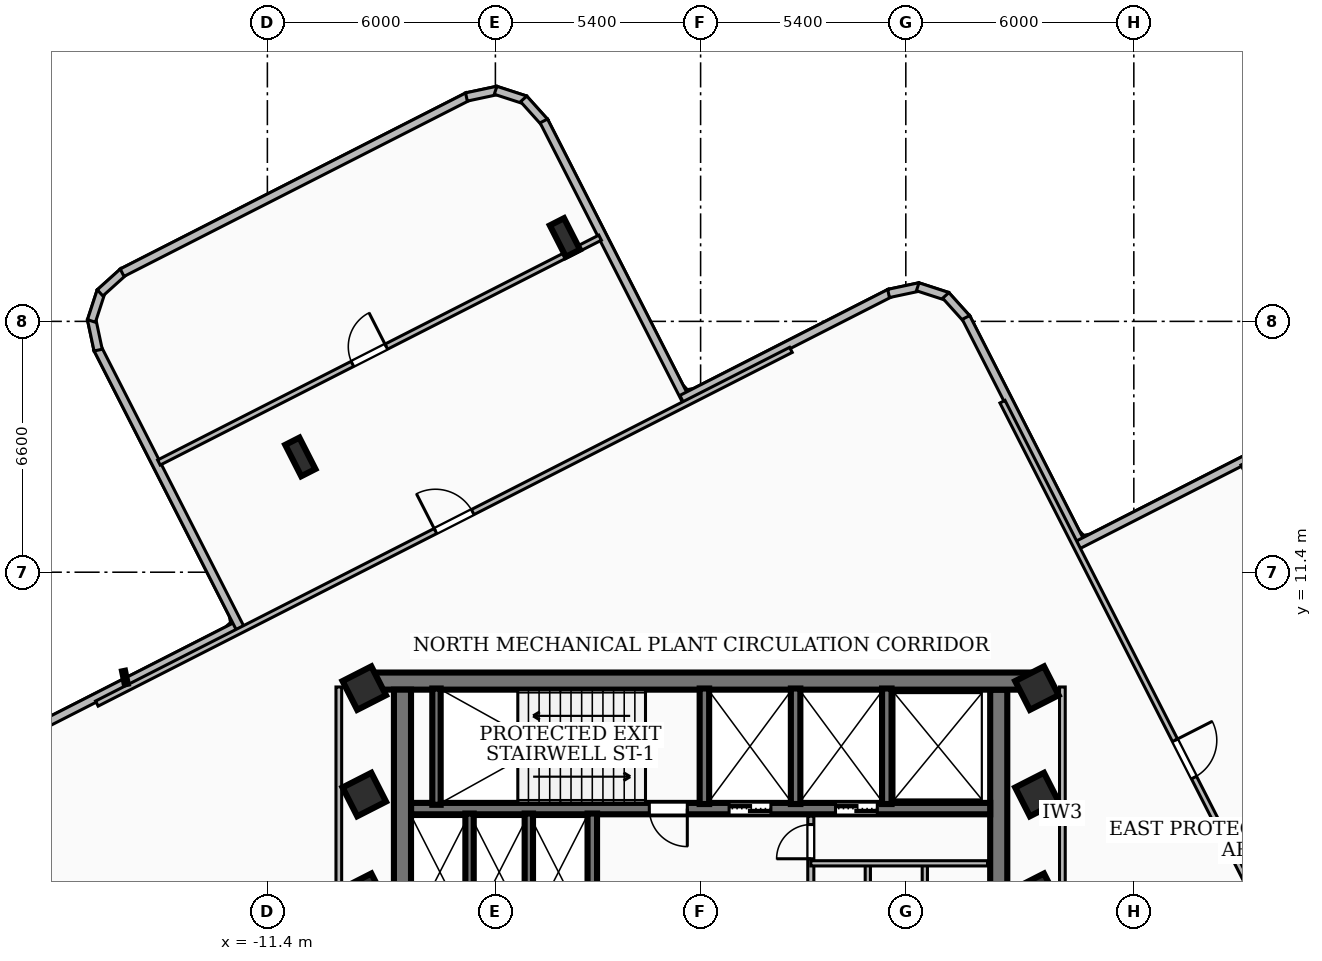
"""IFC4 building model, lengths in metres.
Left out: names, types, materials, properties, quantities, classifications, styles, units other than length and angle.
Written with IfcOpenShell. Run it as: python <this file> out.ifc"""

import sys

from ifc_helpers import new_model, si_unit, direction, frame, frame_2d, origin, origin_2d, place, context, subcontext, project, spatial, rectangle, i_section, extrude, element, fill, save


model = new_model("IFC4")
c1 = context("Model", 3, precision=1e-05, world=origin(), true_north=direction((0.0, 1.0)))
c2 = subcontext(c1, "Body", "Model", "MODEL_VIEW")
j1 = project(units=[si_unit("LENGTHUNIT", "METRE"), si_unit("PLANEANGLEUNIT", "RADIAN")], contexts=[c1])
p1 = place(None, origin())
s1 = spatial("IfcSite", under=j1, at=p1, CompositionType="ELEMENT")
p2 = place(p1, origin())
s2 = spatial("IfcBuilding", under=s1, at=p2, CompositionType="ELEMENT")
p3 = place(p2, frame((0.0, 0.0, 196.2)))
s3 = spatial("IfcBuildingStorey", under=s2, at=p3, CompositionType="ELEMENT", Elevation=196.2)
p4 = place(p3, frame((-8.78, 8.535, 0.0), z_axis=(0.0, 0.0, 1.0), x_axis=(1.0, 0.0, 0.0)))
e1 = element("IfcWall", 1, at=p4, inside=s3, PredefinedType="SHEAR", context=c2, shape_type="SweptSolid", body=[
    extrude(rectangle(XDim=17.56, YDim=0.45, at=frame_2d((8.78, 0.0))), origin(), (0.0, 0.0, 1.0), 4.42),
])
for number, where, z_axis, x_axis in (
    (2, (-7.845, 1.975, 0.0), (0.0, 0.0, 1.0), (0.0, 1.0, 0.0)),
    (3, (7.845, 8.31, 0.0), (0.0, 0.0, 1.0), (0.0, -1.0, 0.0)),
):
    element("IfcWall", number, at=place(p3, frame(where, z_axis=z_axis, x_axis=x_axis)), inside=s3, PredefinedType="SHEAR", context=c2, shape_type="SweptSolid", body=[
        extrude(rectangle(XDim=6.335, YDim=0.45, at=frame_2d((3.167, 0.0))), origin(), (0.0, 0.0, 1.0), 4.42),
    ])
p5 = place(p3, frame((7.62, 5.18, 0.0), z_axis=(0.0, 0.0, 1.0), x_axis=(-1.0, 0.0, 0.0)))
e4 = element("IfcWall", 4, at=p5, inside=s3, PredefinedType="SOLIDWALL", context=c2, shape_type="SweptSolid", body=[
    extrude(rectangle(XDim=15.24, YDim=0.3, at=frame_2d((7.62, 0.0))), origin(), (0.0, 0.0, 1.0), 4.42),
])
p6 = place(p5, frame((5.77, 0.0, 0.0)))
e5 = element("IfcOpeningElement", 5, at=p6, cuts=e4, PredefinedType="OPENING", context=c2, shape_type="SweptSolid", body=[
    extrude(rectangle(XDim=1.1, YDim=2.15, at=frame_2d((0.55, 1.075))), frame((0.0, 0.16, 0.0), z_axis=(0.0, -1.0, 0.0), x_axis=(1.0, 0.0, 0.0)), (0.0, 0.0, 1.0), 0.32),
])
p7 = place(p5, frame((2.97, 0.0, 0.0)))
e6 = element("IfcOpeningElement", 6, at=p7, cuts=e4, PredefinedType="OPENING", context=c2, shape_type="SweptSolid", body=[
    extrude(rectangle(XDim=1.1, YDim=2.15, at=frame_2d((0.55, 1.075))), frame((0.0, 0.16, 0.0), z_axis=(0.0, -1.0, 0.0), x_axis=(1.0, 0.0, 0.0)), (0.0, 0.0, 1.0), 0.32),
])
p8 = place(p5, frame((7.97, 0.0, 0.0)))
e7 = element("IfcOpeningElement", 7, at=p8, cuts=e4, PredefinedType="OPENING", context=c2, shape_type="SweptSolid", body=[
    extrude(rectangle(XDim=1.0, YDim=2.1, at=frame_2d((0.5, 1.05))), frame((0.0, 0.16, 0.0), z_axis=(0.0, -1.0, 0.0), x_axis=(1.0, 0.0, 0.0)), (0.0, 0.0, 1.0), 0.32),
])
p9 = place(p3, frame((-6.95, 5.28, 0.0), z_axis=(0.0, 0.0, 1.0), x_axis=(0.0, 1.0, 0.0)))
e8 = element("IfcWall", 8, at=p9, inside=s3, PredefinedType="SOLIDWALL", context=c2, shape_type="SweptSolid", body=[
    extrude(rectangle(XDim=3.06, YDim=0.22, at=frame_2d((1.53, 0.0))), origin(), (0.0, 0.0, 1.0), 4.42),
])
for number, where, z_axis, x_axis in (
    (9, (0.1, 5.3, 0.0), (0.0, 0.0, 1.0), (0.0, 1.0, 0.0)),
    (10, (2.5, 5.3, 0.0), (0.0, 0.0, 1.0), (0.0, 1.0, 0.0)),
    (11, (4.9, 5.3, 0.0), (0.0, 0.0, 1.0), (0.0, 1.0, 0.0)),
):
    element("IfcWall", number, at=place(p3, frame(where, z_axis=z_axis, x_axis=x_axis)), inside=s3, PredefinedType="SOLIDWALL", context=c2, shape_type="SweptSolid", body=[
        extrude(rectangle(XDim=3.04, YDim=0.25, at=frame_2d((1.52, 0.0))), origin(), (0.0, 0.0, 1.0), 4.42),
    ])
p10 = place(p3, frame((-2.85, 1.98, 0.0), z_axis=(0.0, 0.0, 1.0), x_axis=(0.0, 1.0, 0.0)))
e12 = element("IfcWall", 12, at=p10, inside=s3, PredefinedType="SOLIDWALL", context=c2, shape_type="SweptSolid", body=[
    extrude(rectangle(XDim=3.07, YDim=0.25, at=frame_2d((1.535, 0.0))), origin(), (0.0, 0.0, 1.0), 4.42),
])
for number, where, z_axis, x_axis in (
    (13, (-6.08, 1.98, 0.0), (0.0, 0.0, 1.0), (0.0, 1.0, 0.0)),
    (14, (-4.52, 1.98, 0.0), (0.0, 0.0, 1.0), (0.0, 1.0, 0.0)),
):
    element("IfcWall", number, at=place(p3, frame(where, z_axis=z_axis, x_axis=x_axis)), inside=s3, PredefinedType="SOLIDWALL", context=c2, shape_type="SweptSolid", body=[
        extrude(rectangle(XDim=3.07, YDim=0.22, at=frame_2d((1.535, 0.0))), origin(), (0.0, 0.0, 1.0), 4.42),
    ])
for number, where, z_axis, x_axis in (
    (15, (-8.85, 2.9, 0.0), (0.0, 0.0, 1.0), (0.891, 0.454, 0.0)),
    (16, (-8.85, 5.55, 0.0), (0.0, 0.0, 1.0), (0.891, 0.454, 0.0)),
    (17, (8.85, 2.9, 0.0), (0.0, 0.0, 1.0), (0.891, 0.454, 0.0)),
    (18, (8.85, 5.55, 0.0), (0.0, 0.0, 1.0), (0.891, 0.454, 0.0)),
    (19, (-8.85, 8.35, 0.0), (0.0, 0.0, 1.0), (0.891, 0.454, 0.0)),
    (20, (8.85, 8.35, 0.0), (0.0, 0.0, 1.0), (0.891, 0.454, 0.0)),
):
    element("IfcColumn", number, at=place(p3, frame(where, z_axis=z_axis, x_axis=x_axis)), inside=s3, PredefinedType="COLUMN", context=c2, shape_type="SweptSolid", body=[
        extrude(rectangle(XDim=0.85, YDim=0.85, at=origin_2d()), origin(), (0.0, 0.0, 1.0), 4.68),
    ])
for number, where, z_axis, x_axis in (
    (21, (-3.57, 20.207, 0.0), (0.0, 0.0, 1.0), (0.891, 0.454, 0.0)),
    (22, (-10.533, 14.433, 0.0), (0.0, 0.0, 1.0), (0.891, 0.454, 0.0)),
):
    element("IfcColumn", number, at=place(p3, frame(where, z_axis=z_axis, x_axis=x_axis)), inside=s3, PredefinedType="COLUMN", context=c2, shape_type="SweptSolid", body=[
        extrude(i_section(OverallWidth=0.418, OverallDepth=0.927, WebThickness=0.019, FlangeThickness=0.032, at=origin_2d()), origin(), (0.0, 0.0, 1.0), 4.68),
    ])
p11 = place(p3, frame((-15.954, -0.495, 0.0), z_axis=(0.0, 0.0, 1.0), x_axis=(-0.454003577481, 0.890999860625, 0.0)))
e23 = element("IfcWall", 23, at=p11, inside=s3, PredefinedType="SOLIDWALL", context=c2, shape_type="SweptSolid", body=[
    extrude(rectangle(XDim=6.158, YDim=0.22, at=frame_2d((3.079, 0.0))), origin(), (0.0, 0.0, 1.0), 2.212),
])
p12 = place(p3, frame((-18.103, 6.983, 0.0), z_axis=(0.0, 0.0, 1.0), x_axis=(0.890990691232, 0.454021572326, 0.0)))
e24 = element("IfcWall", 24, at=p12, inside=s3, PredefinedType="SOLIDWALL", context=c2, shape_type="SweptSolid", body=[
    extrude(rectangle(XDim=6.758, YDim=0.22, at=frame_2d((3.379, 0.0))), origin(), (0.0, 0.0, 1.0), 2.212),
])
p13 = place(p3, frame((-12.12, 9.933, 0.0), z_axis=(0.0, 0.0, 1.0), x_axis=(-0.454013036743, 0.890995040652, 0.0)))
e25 = element("IfcWall", 25, at=p13, inside=s3, PredefinedType="SOLIDWALL", context=c2, shape_type="SweptSolid", body=[
    extrude(rectangle(XDim=8.257, YDim=0.22, at=frame_2d((4.128, 0.0))), origin(), (0.0, 0.0, 1.0), 2.212),
])
p14 = place(p3, frame((-15.853, 17.244, 0.0), z_axis=(0.0, 0.0, 1.0), x_axis=(-0.207427745347, 0.978250341406, 0.0)))
e26 = element("IfcWall", 26, at=p14, inside=s3, PredefinedType="SOLIDWALL", context=c2, shape_type="SweptSolid", body=[
    extrude(rectangle(XDim=0.833, YDim=0.22, at=frame_2d((0.417, 0.0))), origin(), (0.0, 0.0, 1.0), 4.42),
])
p15 = place(p3, frame((-16.029, 18.011, 0.0), z_axis=(0.0, 0.0, 1.0), x_axis=(0.309792535048, 0.950804178172, 0.0)))
e27 = element("IfcWall", 27, at=p15, inside=s3, PredefinedType="SOLIDWALL", context=c2, shape_type="SweptSolid", body=[
    extrude(rectangle(XDim=0.82, YDim=0.22, at=frame_2d((0.41, 0.0))), origin(), (0.0, 0.0, 1.0), 4.42),
])
p16 = place(p3, frame((-15.802, 18.75, 0.0), z_axis=(0.0, 0.0, 1.0), x_axis=(0.742712283539, 0.669610680829, 0.0)))
e28 = element("IfcWall", 28, at=p16, inside=s3, PredefinedType="SOLIDWALL", context=c2, shape_type="SweptSolid", body=[
    extrude(rectangle(XDim=0.835, YDim=0.22, at=frame_2d((0.417, 0.0))), origin(), (0.0, 0.0, 1.0), 4.42),
])
p17 = place(p3, frame((-15.223, 19.281, 0.0), z_axis=(0.0, 0.0, 1.0), x_axis=(0.891057908133, 0.453889638959, 0.0)))
e29 = element("IfcWall", 29, at=p17, inside=s3, PredefinedType="SOLIDWALL", context=c2, shape_type="SweptSolid", body=[
    extrude(rectangle(XDim=10.22, YDim=0.22, at=frame_2d((5.11, 0.0))), origin(), (0.0, 0.0, 1.0), 4.42),
])
p18 = place(p3, frame((-6.162, 23.904, 0.0), z_axis=(0.0, 0.0, 1.0), x_axis=(0.978250341406, 0.207427745347, 0.0)))
e30 = element("IfcWall", 30, at=p18, inside=s3, PredefinedType="SOLIDWALL", context=c2, shape_type="SweptSolid", body=[
    extrude(rectangle(XDim=0.833, YDim=0.22, at=frame_2d((0.417, 0.0))), origin(), (0.0, 0.0, 1.0), 4.42),
])
p19 = place(p3, frame((-5.395, 24.08, 0.0), z_axis=(0.0, 0.0, 1.0), x_axis=(0.951154322348, -0.308715816049, 0.0)))
e31 = element("IfcWall", 31, at=p19, inside=s3, PredefinedType="SOLIDWALL", context=c2, shape_type="SweptSolid", body=[
    extrude(rectangle(XDim=0.82, YDim=0.22, at=frame_2d((0.41, 0.0))), origin(), (0.0, 0.0, 1.0), 4.42),
])
p20 = place(p3, frame((-4.656, 23.854, 0.0), z_axis=(0.0, 0.0, 1.0), x_axis=(0.668382995588, -0.743817296928, 0.0)))
e32 = element("IfcWall", 32, at=p20, inside=s3, PredefinedType="SOLIDWALL", context=c2, shape_type="SweptSolid", body=[
    extrude(rectangle(XDim=0.835, YDim=0.22, at=frame_2d((0.417, 0.0))), origin(), (0.0, 0.0, 1.0), 4.42),
])
p21 = place(p3, frame((-4.126, 23.274, 0.0), z_axis=(0.0, 0.0, 1.0), x_axis=(0.453988669087, -0.89100745695, 0.0)))
e33 = element("IfcWall", 33, at=p21, inside=s3, PredefinedType="SOLIDWALL", context=c2, shape_type="SweptSolid", body=[
    extrude(rectangle(XDim=8.258, YDim=0.22, at=frame_2d((4.129, 0.0))), origin(), (0.0, 0.0, 1.0), 2.212),
])
p22 = place(p3, frame((-0.495, 15.954, 0.0), z_axis=(0.0, 0.0, 1.0), x_axis=(0.890999860625, 0.454003577481, 0.0)))
e34 = element("IfcWall", 34, at=p22, inside=s3, PredefinedType="SOLIDWALL", context=c2, shape_type="SweptSolid", body=[
    extrude(rectangle(XDim=6.158, YDim=0.22, at=frame_2d((3.079, 0.0))), origin(), (0.0, 0.0, 1.0), 2.212),
])
p23 = place(p3, frame((4.946, 18.734, 0.0), z_axis=(0.0, 0.0, 1.0), x_axis=(0.978178210569, 0.207767630705, 0.0)))
e35 = element("IfcWall", 35, at=p23, inside=s3, PredefinedType="SOLIDWALL", context=c2, shape_type="SweptSolid", body=[
    extrude(rectangle(XDim=0.833, YDim=0.22, at=frame_2d((0.417, 0.0))), origin(), (0.0, 0.0, 1.0), 4.42),
])
p24 = place(p3, frame((5.713, 18.91, 0.0), z_axis=(0.0, 0.0, 1.0), x_axis=(0.950891804303, -0.309523466815, 0.0)))
e36 = element("IfcWall", 36, at=p24, inside=s3, PredefinedType="SOLIDWALL", context=c2, shape_type="SweptSolid", body=[
    extrude(rectangle(XDim=0.82, YDim=0.22, at=frame_2d((0.41, 0.0))), origin(), (0.0, 0.0, 1.0), 4.42),
])
p25 = place(p3, frame((6.452, 18.683, 0.0), z_axis=(0.0, 0.0, 1.0), x_axis=(0.669029293194, -0.743236035758, 0.0)))
e37 = element("IfcWall", 37, at=p25, inside=s3, PredefinedType="SOLIDWALL", context=c2, shape_type="SweptSolid", body=[
    extrude(rectangle(XDim=0.836, YDim=0.22, at=frame_2d((0.418, 0.0))), origin(), (0.0, 0.0, 1.0), 4.42),
])
p26 = place(p3, frame((6.983, 18.103, 0.0), z_axis=(0.0, 0.0, 1.0), x_axis=(0.454021572326, -0.890990691232, 0.0)))
e38 = element("IfcWall", 38, at=p26, inside=s3, PredefinedType="SOLIDWALL", context=c2, shape_type="SweptSolid", body=[
    extrude(rectangle(XDim=6.758, YDim=0.22, at=frame_2d((3.379, 0.0))), origin(), (0.0, 0.0, 1.0), 2.212),
])
p27 = place(p3, frame((9.933, 12.12, 0.0), z_axis=(0.0, 0.0, 1.0), x_axis=(0.89101832643, 0.453967335792, 0.0)))
e39 = element("IfcWall", 39, at=p27, inside=s3, PredefinedType="SOLIDWALL", context=c2, shape_type="SweptSolid", body=[
    extrude(rectangle(XDim=9.857, YDim=0.22, at=frame_2d((4.929, 0.0))), origin(), (0.0, 0.0, 1.0), 2.212),
])
p28 = place(p3, frame((2.9, 2.04, 0.0), z_axis=(0.0, 0.0, 1.0), x_axis=(0.0, 1.0, 0.0)))
e40 = element("IfcWall", 40, at=p28, inside=s3, PredefinedType="PARTITIONING", context=c2, shape_type="SweptSolid", body=[
    extrude(rectangle(XDim=2.94, YDim=0.16, at=frame_2d((1.47, 0.0))), origin(), (0.0, 0.0, 1.0), 3.65),
])
p29 = place(p28, frame((1.82, 0.0, 0.0)))
e41 = element("IfcOpeningElement", 41, at=p29, cuts=e40, PredefinedType="OPENING", context=c2, shape_type="SweptSolid", body=[
    extrude(rectangle(XDim=0.9, YDim=2.06, at=frame_2d((0.45, 1.03))), frame((0.0, 0.09, 0.0), z_axis=(0.0, -1.0, 0.0), x_axis=(1.0, 0.0, 0.0)), (0.0, 0.0, 1.0), 0.18),
])
p30 = place(p3, frame((2.9, 3.74, 0.0), z_axis=(0.0, 0.0, 1.0), x_axis=(1.0, 0.0, 0.0)))
e42 = element("IfcWall", 42, at=p30, inside=s3, PredefinedType="PARTITIONING", context=c2, shape_type="SweptSolid", body=[
    extrude(rectangle(XDim=4.65, YDim=0.138, at=frame_2d((2.325, 0.0))), origin(), (0.0, 0.0, 1.0), 4.42),
])
for number, where, z_axis, x_axis in (
    (43, (4.4, 1.85, 0.0), (0.0, 0.0, 1.0), (0.0, 1.0, 0.0)),
    (44, (5.9, 1.85, 0.0), (0.0, 0.0, 1.0), (0.0, 1.0, 0.0)),
):
    element("IfcWall", number, at=place(p3, frame(where, z_axis=z_axis, x_axis=x_axis)), inside=s3, PredefinedType="PARTITIONING", context=c2, shape_type="SweptSolid", body=[
        extrude(rectangle(XDim=1.89, YDim=0.138, at=frame_2d((0.945, 0.0))), origin(), (0.0, 0.0, 1.0), 3.65),
    ])
p31 = place(p3, frame((-9.52, 1.75, 0.0), z_axis=(0.0, 0.0, 1.0), x_axis=(0.0, 1.0, 0.0)))
e45 = element("IfcWall", 45, at=p31, inside=s3, PredefinedType="PARTITIONING", context=c2, shape_type="SweptSolid", body=[
    extrude(rectangle(XDim=6.63, YDim=0.15, at=frame_2d((3.315, 0.0))), origin(), (0.0, 0.0, 1.0), 4.42),
])
p32 = place(p3, frame((9.52, 1.75, 0.0), z_axis=(0.0, 0.0, 1.0), x_axis=(0.0, 1.0, 0.0)))
e46 = element("IfcWall", 46, at=p32, inside=s3, PredefinedType="PARTITIONING", context=c2, shape_type="SweptSolid", body=[
    extrude(rectangle(XDim=6.63, YDim=0.15, at=frame_2d((3.315, 0.0))), origin(), (0.0, 0.0, 1.0), 2.212),
])
p33 = place(p3, frame((7.943, 15.887, 0.0), z_axis=(0.0, 0.0, 1.0), x_axis=(0.454027476073, -0.890987682839, 0.0)))
e47 = element("IfcWall", 47, at=p33, inside=s3, PredefinedType="PARTITIONING", context=c2, shape_type="SweptSolid", body=[
    extrude(rectangle(XDim=20.499, YDim=0.15, at=frame_2d((10.249, 0.0))), origin(), (0.0, 0.0, 1.0), 2.212),
])
p34 = place(p33, frame((10.0, 0.0, 0.0)))
e48 = element("IfcOpeningElement", 48, at=p34, cuts=e47, PredefinedType="OPENING", context=c2, shape_type="SweptSolid", body=[
    extrude(rectangle(XDim=1.1, YDim=2.15, at=frame_2d((0.55, 1.075))), frame((0.0, 0.085, 0.0), z_axis=(0.0, -1.0, 0.0), x_axis=(1.0, 0.0, 0.0)), (0.0, 0.0, 1.0), 0.17),
])
p35 = place(p3, frame((14.286, 14.254, 0.0), z_axis=(0.0, 0.0, 1.0), x_axis=(0.454050966536, -0.890975712232, 0.0)))
e49 = element("IfcWall", 49, at=p35, inside=s3, PredefinedType="PARTITIONING", context=c2, shape_type="SweptSolid", body=[
    extrude(rectangle(XDim=13.029, YDim=0.15, at=frame_2d((6.515, 0.0))), origin(), (0.0, 0.0, 1.0), 2.212),
])
p36 = place(p35, frame((5.715, 0.0, 0.0)))
e50 = element("IfcOpeningElement", 50, at=p36, cuts=e49, PredefinedType="OPENING", context=c2, shape_type="SweptSolid", body=[
    extrude(rectangle(XDim=1.0, YDim=2.1, at=frame_2d((0.5, 1.05))), frame((0.0, 0.085, 0.0), z_axis=(0.0, -1.0, 0.0), x_axis=(1.0, 0.0, 0.0)), (0.0, 0.0, 1.0), 0.17),
])
p37 = place(p3, frame((-15.887, 7.943, 0.0), z_axis=(0.0, 0.0, 1.0), x_axis=(0.890987682839, 0.454027476073, 0.0)))
e51 = element("IfcWall", 51, at=p37, inside=s3, PredefinedType="PARTITIONING", context=c2, shape_type="SweptSolid", body=[
    extrude(rectangle(XDim=20.499, YDim=0.15, at=frame_2d((10.249, 0.0))), origin(), (0.0, 0.0, 1.0), 2.212),
])
p38 = place(p37, frame((10.0, 0.0, 0.0)))
e52 = element("IfcOpeningElement", 52, at=p38, cuts=e51, PredefinedType="OPENING", context=c2, shape_type="SweptSolid", body=[
    extrude(rectangle(XDim=1.1, YDim=2.15, at=frame_2d((0.55, 1.075))), frame((0.0, 0.085, 0.0), z_axis=(0.0, -1.0, 0.0), x_axis=(1.0, 0.0, 0.0)), (0.0, 0.0, 1.0), 0.17),
])
p39 = place(p3, frame((-14.254, 14.286, 0.0), z_axis=(0.0, 0.0, 1.0), x_axis=(0.890975712232, 0.454050966536, 0.0)))
e53 = element("IfcWall", 53, at=p39, inside=s3, PredefinedType="PARTITIONING", context=c2, shape_type="SweptSolid", body=[
    extrude(rectangle(XDim=13.029, YDim=0.15, at=frame_2d((6.515, 0.0))), origin(), (0.0, 0.0, 1.0), 2.212),
])
p40 = place(p39, frame((5.715, 0.0, 0.0)))
e54 = element("IfcOpeningElement", 54, at=p40, cuts=e53, PredefinedType="OPENING", context=c2, shape_type="SweptSolid", body=[
    extrude(rectangle(XDim=1.0, YDim=2.1, at=frame_2d((0.5, 1.05))), frame((0.0, 0.085, 0.0), z_axis=(0.0, -1.0, 0.0), x_axis=(1.0, 0.0, 0.0)), (0.0, 0.0, 1.0), 0.17),
])
p41 = place(p6, origin())
e55 = element("IfcDoor", 55, at=p41, inside=s3, OperationType="DOUBLE_DOOR_SLIDING", PredefinedType="DOOR", context=c2, shape_type="SweptSolid", body=[
    extrude(rectangle(XDim=1.1, YDim=2.15, at=frame_2d((0.55, 1.075))), frame((0.0, 0.025, 0.0), z_axis=(0.0, -1.0, 0.0), x_axis=(1.0, 0.0, 0.0)), (0.0, 0.0, 1.0), 0.05),
])
fill(e5, e55)
p42 = place(p7, origin())
e56 = element("IfcDoor", 56, at=p42, inside=s3, OperationType="DOUBLE_DOOR_SLIDING", PredefinedType="DOOR", context=c2, shape_type="SweptSolid", body=[
    extrude(rectangle(XDim=1.1, YDim=2.15, at=frame_2d((0.55, 1.075))), frame((0.0, 0.025, 0.0), z_axis=(0.0, -1.0, 0.0), x_axis=(1.0, 0.0, 0.0)), (0.0, 0.0, 1.0), 0.05),
])
fill(e6, e56)
p43 = place(p8, origin())
e57 = element("IfcDoor", 57, at=p43, inside=s3, OperationType="SINGLE_SWING_LEFT", PredefinedType="DOOR", context=c2, shape_type="SweptSolid", body=[
    extrude(rectangle(XDim=1.0, YDim=2.1, at=frame_2d((0.5, 1.05))), frame((0.0, 0.025, 0.0), z_axis=(0.0, -1.0, 0.0), x_axis=(1.0, 0.0, 0.0)), (0.0, 0.0, 1.0), 0.05),
])
fill(e7, e57)
p44 = place(p29, origin())
e58 = element("IfcDoor", 58, at=p44, inside=s3, OperationType="SINGLE_SWING_LEFT", PredefinedType="DOOR", context=c2, shape_type="SweptSolid", body=[
    extrude(rectangle(XDim=0.9, YDim=2.06, at=frame_2d((0.45, 1.03))), frame((0.0, 0.025, 0.0), z_axis=(0.0, -1.0, 0.0), x_axis=(1.0, 0.0, 0.0)), (0.0, 0.0, 1.0), 0.05),
])
fill(e41, e58)
p45 = place(p34, origin())
e59 = element("IfcDoor", 59, at=p45, inside=s3, OperationType="SINGLE_SWING_LEFT", PredefinedType="DOOR", context=c2, shape_type="SweptSolid", body=[
    extrude(rectangle(XDim=1.1, YDim=2.15, at=frame_2d((0.55, 1.075))), frame((0.0, 0.025, 0.0), z_axis=(0.0, -1.0, 0.0), x_axis=(1.0, 0.0, 0.0)), (0.0, 0.0, 1.0), 0.05),
])
fill(e48, e59)
p46 = place(p38, origin())
e60 = element("IfcDoor", 60, at=p46, inside=s3, OperationType="SINGLE_SWING_LEFT", PredefinedType="DOOR", context=c2, shape_type="SweptSolid", body=[
    extrude(rectangle(XDim=1.1, YDim=2.15, at=frame_2d((0.55, 1.075))), frame((0.0, 0.025, 0.0), z_axis=(0.0, -1.0, 0.0), x_axis=(1.0, 0.0, 0.0)), (0.0, 0.0, 1.0), 0.05),
])
fill(e52, e60)
p47 = place(p40, origin())
e61 = element("IfcDoor", 61, at=p47, inside=s3, OperationType="SINGLE_SWING_RIGHT", PredefinedType="DOOR", context=c2, shape_type="SweptSolid", body=[
    extrude(rectangle(XDim=1.0, YDim=2.1, at=frame_2d((0.5, 1.05))), frame((0.0, 0.025, 0.0), z_axis=(0.0, -1.0, 0.0), x_axis=(1.0, 0.0, 0.0)), (0.0, 0.0, 1.0), 0.05),
])
fill(e54, e61)
save(model, sys.argv[1])
